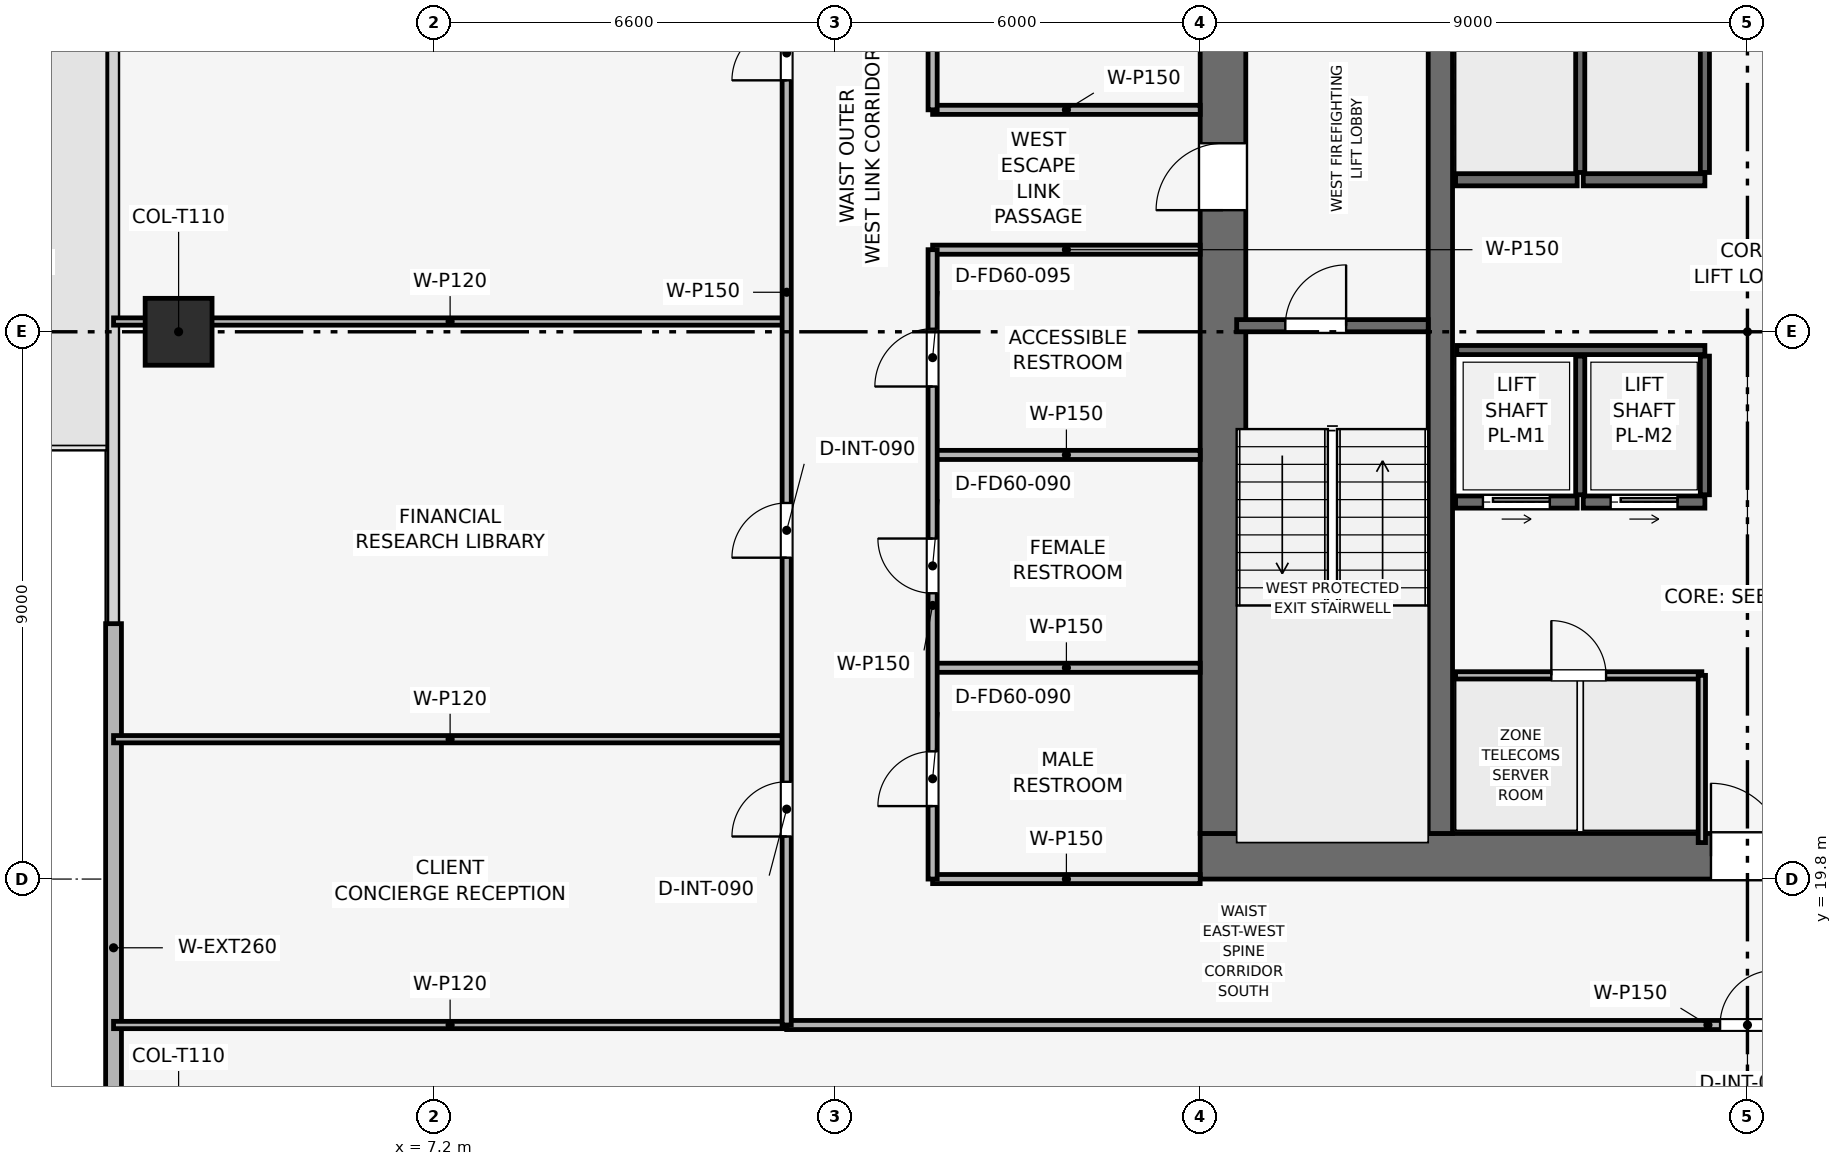
"""IFC4 building model, lengths in metres.
Left out: names, types, materials, properties, quantities, classifications, styles, units other than length and angle.
Written with IfcOpenShell. Run it as: python <this file> out.ifc"""

import sys

from ifc_helpers import new_model, si_unit, direction, frame, frame_2d, origin, origin_2d, place, context, subcontext, project, spatial, rectangle, extrude, element, fill, save


model = new_model("IFC4")
c1 = context("Model", 3, precision=1e-05, world=origin(), true_north=direction((0.0, 1.0)))
c2 = subcontext(c1, "Body", "Model", "MODEL_VIEW")
j1 = project(units=[si_unit("LENGTHUNIT", "METRE"), si_unit("PLANEANGLEUNIT", "RADIAN")], contexts=[c1])
p1 = place(None, origin())
s1 = spatial("IfcSite", under=j1, at=p1, CompositionType="ELEMENT")
p2 = place(p1, origin())
s2 = spatial("IfcBuilding", under=s1, at=p2, CompositionType="ELEMENT")
p3 = place(p2, frame((0.0, 0.0, 207.45)))
s3 = spatial("IfcBuildingStorey", under=s2, at=p3, CompositionType="ELEMENT", Elevation=207.45)
p4 = place(p3, frame((19.8, 20.175, 0.0), z_axis=(0.0, 0.0, 1.0), x_axis=(1.0, 0.0, 0.0)))
e1 = element("IfcWall", 1, at=p4, inside=s3, PredefinedType="SHEAR", context=c2, shape_type="SweptSolid", body=[
    extrude(rectangle(XDim=18.0, YDim=0.75, at=frame_2d((9.0, 0.0))), origin(), (0.0, 0.0, 1.0), 3.75),
])
p5 = place(p4, frame((8.4, 0.0, 0.0)))
e2 = element("IfcOpeningElement", 2, at=p5, cuts=e1, PredefinedType="OPENING", context=c2, shape_type="SweptSolid", body=[
    extrude(rectangle(XDim=1.2, YDim=2.2, at=frame_2d((0.6, 1.1))), frame((0.0, 0.385, 0.0), z_axis=(0.0, -1.0, 0.0), x_axis=(1.0, 0.0, 0.0)), (0.0, 0.0, 1.0), 0.77),
])
p6 = place(p3, frame((20.175, 20.55, 0.0), z_axis=(0.0, 0.0, 1.0), x_axis=(0.0, 1.0, 0.0)))
e3 = element("IfcWall", 3, at=p6, inside=s3, PredefinedType="SHEAR", context=c2, shape_type="SweptSolid", body=[
    extrude(rectangle(XDim=16.5, YDim=0.75, at=frame_2d((8.25, 0.0))), origin(), (0.0, 0.0, 1.0), 3.75),
])
p7 = place(p6, frame((10.25, 0.0, 0.0)))
e4 = element("IfcOpeningElement", 4, at=p7, cuts=e3, PredefinedType="OPENING", context=c2, shape_type="SweptSolid", body=[
    extrude(rectangle(XDim=1.1, YDim=2.15, at=frame_2d((0.55, 1.075))), frame((0.0, 0.385, 0.0), z_axis=(0.0, -1.0, 0.0), x_axis=(1.0, 0.0, 0.0)), (0.0, 0.0, 1.0), 0.77),
])
p8 = place(p3, frame((23.75, 20.55, 0.0), z_axis=(0.0, 0.0, 1.0), x_axis=(0.0, 1.0, 0.0)))
e5 = element("IfcWall", 5, at=p8, inside=s3, PredefinedType="SHEAR", context=c2, shape_type="SweptSolid", body=[
    extrude(rectangle(XDim=16.5, YDim=0.4, at=frame_2d((8.25, 0.0))), origin(), (0.0, 0.0, 1.0), 3.75),
])
p9 = place(p3, frame((3.0, 28.8, 0.003), z_axis=(0.0, 0.0, 1.0), x_axis=(1.0, 0.0, 0.0)))
e6 = element("IfcColumn", 6, at=p9, inside=s3, PredefinedType="COLUMN", context=c2, shape_type="SweptSolid", body=[
    extrude(rectangle(XDim=1.1, YDim=1.1, at=origin_2d()), origin(), (0.0, 0.0, 1.0), 3.494),
])
p10 = place(p3, frame((1.93, 9.3, 0.0), z_axis=(0.0, 0.0, 1.0), x_axis=(0.0, 1.0, 0.0)))
e7 = element("IfcWall", 7, at=p10, inside=s3, PredefinedType="SOLIDWALL", context=c2, shape_type="SweptSolid", body=[
    extrude(rectangle(XDim=14.7, YDim=0.26, at=frame_2d((7.35, 0.0))), origin(), (0.0, 0.0, 1.0), 3.5),
])
p11 = place(p10, frame((0.25, 0.0, 0.9)))
e8 = element("IfcOpeningElement", 8, at=p11, cuts=e7, PredefinedType="OPENING", context=c2, shape_type="SweptSolid", body=[
    extrude(rectangle(XDim=3.8, YDim=1.9, at=frame_2d((1.9, 0.95))), frame((0.0, 0.14, 0.0), z_axis=(0.0, -1.0, 0.0), x_axis=(1.0, 0.0, 0.0)), (0.0, 0.0, 1.0), 0.28),
])
p12 = place(p3, frame((20.4, 28.9, 0.0), z_axis=(0.0, 0.0, 1.0), x_axis=(1.0, 0.0, 0.0)))
e9 = element("IfcWall", 9, at=p12, inside=s3, PredefinedType="SHEAR", context=c2, shape_type="SweptSolid", body=[
    extrude(rectangle(XDim=3.15, YDim=0.2, at=frame_2d((1.575, 0.0))), origin(), (0.0, 0.0, 1.0), 3.5),
])
p13 = place(p12, frame((0.8, 0.0, 0.0)))
e10 = element("IfcOpeningElement", 10, at=p13, cuts=e9, PredefinedType="OPENING", context=c2, shape_type="SweptSolid", body=[
    extrude(rectangle(XDim=1.0, YDim=2.1, at=frame_2d((0.5, 1.05))), frame((0.0, 0.11, 0.0), z_axis=(0.0, -1.0, 0.0), x_axis=(1.0, 0.0, 0.0)), (0.0, 0.0, 1.0), 0.22),
])
p14 = place(p3, frame((24.0, 26.0, 0.0), z_axis=(0.0, 0.0, 1.0), x_axis=(1.0, 0.0, 0.0)))
e11 = element("IfcWall", 11, at=p14, inside=s3, PredefinedType="SHEAR", context=c2, shape_type="SweptSolid", body=[
    extrude(rectangle(XDim=2.0, YDim=0.2, at=frame_2d((1.0, 0.0))), origin(), (0.0, 0.0, 1.0), 3.5),
])
p15 = place(p14, frame((0.45, 0.0, 0.0)))
e12 = element("IfcOpeningElement", 12, at=p15, cuts=e11, PredefinedType="OPENING", context=c2, shape_type="SweptSolid", body=[
    extrude(rectangle(XDim=1.1, YDim=2.15, at=frame_2d((0.55, 1.075))), frame((0.0, 0.11, 0.0), z_axis=(0.0, -1.0, 0.0), x_axis=(1.0, 0.0, 0.0)), (0.0, 0.0, 1.0), 0.22),
])
p16 = place(p3, frame((26.1, 26.0, 0.0), z_axis=(0.0, 0.0, 1.0), x_axis=(1.0, 0.0, 0.0)))
e13 = element("IfcWall", 13, at=p16, inside=s3, PredefinedType="SHEAR", context=c2, shape_type="SweptSolid", body=[
    extrude(rectangle(XDim=2.0, YDim=0.2, at=frame_2d((1.0, 0.0))), origin(), (0.0, 0.0, 1.0), 3.5),
])
p17 = place(p16, frame((0.45, 0.0, 0.0)))
e14 = element("IfcOpeningElement", 14, at=p17, cuts=e13, PredefinedType="OPENING", context=c2, shape_type="SweptSolid", body=[
    extrude(rectangle(XDim=1.1, YDim=2.15, at=frame_2d((0.55, 1.075))), frame((0.0, 0.11, 0.0), z_axis=(0.0, -1.0, 0.0), x_axis=(1.0, 0.0, 0.0)), (0.0, 0.0, 1.0), 0.22),
])
for number, where, z_axis, x_axis in (
    (15, (24.0, 31.3, 0.0), (0.0, 0.0, 1.0), (1.0, 0.0, 0.0)),
    (16, (26.1, 31.3, 0.0), (0.0, 0.0, 1.0), (1.0, 0.0, 0.0)),
):
    element("IfcWall", number, at=place(p3, frame(where, z_axis=z_axis, x_axis=x_axis)), inside=s3, PredefinedType="SHEAR", context=c2, shape_type="SweptSolid", body=[
        extrude(rectangle(XDim=2.0, YDim=0.2, at=frame_2d((1.0, 0.0))), origin(), (0.0, 0.0, 1.0), 3.5),
    ])
p18 = place(p3, frame((24.02, 28.5, 0.0), z_axis=(0.0, 0.0, 1.0), x_axis=(1.0, 0.0, 0.0)))
e17 = element("IfcWall", 17, at=p18, inside=s3, PredefinedType="SHEAR", context=c2, shape_type="SweptSolid", body=[
    extrude(rectangle(XDim=4.08, YDim=0.15, at=frame_2d((2.04, 0.0))), origin(), (0.0, 0.0, 1.0), 3.5),
])
for number, where, z_axis, x_axis in (
    (18, (26.05, 26.12, 0.0), (0.0, 0.0, 1.0), (0.0, 1.0, 0.0)),
    (19, (28.1, 26.12, 0.0), (0.0, 0.0, 1.0), (0.0, 1.0, 0.0)),
):
    element("IfcWall", number, at=place(p3, frame(where, z_axis=z_axis, x_axis=x_axis)), inside=s3, PredefinedType="SHEAR", context=c2, shape_type="SweptSolid", body=[
        extrude(rectangle(XDim=2.28, YDim=0.15, at=frame_2d((1.14, 0.0))), origin(), (0.0, 0.0, 1.0), 3.5),
    ])
for number, where, z_axis, x_axis in (
    (20, (26.05, 31.42, 0.0), (0.0, 0.0, 1.0), (0.0, 1.0, 0.0)),
    (21, (28.1, 31.42, 0.0), (0.0, 0.0, 1.0), (0.0, 1.0, 0.0)),
):
    element("IfcWall", number, at=place(p3, frame(where, z_axis=z_axis, x_axis=x_axis)), inside=s3, PredefinedType="SHEAR", context=c2, shape_type="SweptSolid", body=[
        extrude(rectangle(XDim=2.24, YDim=0.15, at=frame_2d((1.12, 0.0))), origin(), (0.0, 0.0, 1.0), 3.5),
    ])
p19 = place(p3, frame((24.0, 23.15, 0.0), z_axis=(0.0, 0.0, 1.0), x_axis=(1.0, 0.0, 0.0)))
e22 = element("IfcWall", 22, at=p19, inside=s3, PredefinedType="PARTITIONING", context=c2, shape_type="SweptSolid", body=[
    extrude(rectangle(XDim=4.05, YDim=0.12, at=frame_2d((2.025, 0.0))), origin(), (0.0, 0.0, 1.0), 3.5),
])
p20 = place(p19, frame((1.575, 0.0, 0.0)))
e23 = element("IfcOpeningElement", 23, at=p20, cuts=e22, PredefinedType="OPENING", context=c2, shape_type="SweptSolid", body=[
    extrude(rectangle(XDim=0.9, YDim=2.1, at=frame_2d((0.45, 1.05))), frame((0.0, 0.07, 0.0), z_axis=(0.0, -1.0, 0.0), x_axis=(1.0, 0.0, 0.0)), (0.0, 0.0, 1.0), 0.14),
])
p21 = place(p3, frame((28.05, 20.4, 0.0), z_axis=(0.0, 0.0, 1.0), x_axis=(0.0, 1.0, 0.0)))
e24 = element("IfcWall", 24, at=p21, inside=s3, PredefinedType="PARTITIONING", context=c2, shape_type="SweptSolid", body=[
    extrude(rectangle(XDim=2.75, YDim=0.12, at=frame_2d((1.375, 0.0))), origin(), (0.0, 0.0, 1.0), 3.5),
])
p22 = place(p3, frame((15.4, 19.8, 0.0), z_axis=(0.0, 0.0, 1.0), x_axis=(1.0, 0.0, 0.0)))
e25 = element("IfcWall", 25, at=p22, inside=s3, PredefinedType="PARTITIONING", context=c2, shape_type="SweptSolid", body=[
    extrude(rectangle(XDim=4.4, YDim=0.15, at=frame_2d((2.2, 0.0))), origin(), (0.0, 0.0, 1.0), 3.035),
])
for number, where, z_axis, x_axis in (
    (26, (15.4, 23.275, 0.0), (0.0, 0.0, 1.0), (1.0, 0.0, 0.0)),
    (27, (15.4, 26.775, 0.0), (0.0, 0.0, 1.0), (1.0, 0.0, 0.0)),
    (28, (15.4, 30.15, 0.0), (0.0, 0.0, 1.0), (1.0, 0.0, 0.0)),
    (29, (15.4, 32.45, 0.0), (0.0, 0.0, 1.0), (1.0, 0.0, 0.0)),
):
    element("IfcWall", number, at=place(p3, frame(where, z_axis=z_axis, x_axis=x_axis)), inside=s3, PredefinedType="PARTITIONING", context=c2, shape_type="SweptSolid", body=[
        extrude(rectangle(XDim=4.4, YDim=0.15, at=frame_2d((2.2, 0.0))), origin(), (0.0, 0.0, 1.0), 3.5),
    ])
p23 = place(p3, frame((15.4, 19.8, 0.0), z_axis=(0.0, 0.0, 1.0), x_axis=(0.0, 1.0, 0.0)))
e30 = element("IfcWall", 30, at=p23, inside=s3, PredefinedType="PARTITIONING", context=c2, shape_type="SweptSolid", body=[
    extrude(rectangle(XDim=10.35, YDim=0.15, at=frame_2d((5.175, 0.0))), origin(), (0.0, 0.0, 1.0), 3.035),
])
p24 = place(p23, frame((1.2, 0.0, 0.0)))
e31 = element("IfcOpeningElement", 31, at=p24, cuts=e30, PredefinedType="OPENING", context=c2, shape_type="SweptSolid", body=[
    extrude(rectangle(XDim=0.9, YDim=2.1, at=frame_2d((0.45, 1.05))), frame((0.0, 0.085, 0.0), z_axis=(0.0, -1.0, 0.0), x_axis=(1.0, 0.0, 0.0)), (0.0, 0.0, 1.0), 0.17),
])
p25 = place(p23, frame((4.7, 0.0, 0.0)))
e32 = element("IfcOpeningElement", 32, at=p25, cuts=e30, PredefinedType="OPENING", context=c2, shape_type="SweptSolid", body=[
    extrude(rectangle(XDim=0.9, YDim=2.1, at=frame_2d((0.45, 1.05))), frame((0.0, 0.085, 0.0), z_axis=(0.0, -1.0, 0.0), x_axis=(1.0, 0.0, 0.0)), (0.0, 0.0, 1.0), 0.17),
])
p26 = place(p23, frame((8.1, 0.0, 0.0)))
e33 = element("IfcOpeningElement", 33, at=p26, cuts=e30, PredefinedType="OPENING", context=c2, shape_type="SweptSolid", body=[
    extrude(rectangle(XDim=0.95, YDim=2.1, at=frame_2d((0.475, 1.05))), frame((0.0, 0.085, 0.0), z_axis=(0.0, -1.0, 0.0), x_axis=(1.0, 0.0, 0.0)), (0.0, 0.0, 1.0), 0.17),
])
p27 = place(p3, frame((15.4, 32.45, 0.0), z_axis=(0.0, 0.0, 1.0), x_axis=(0.0, 1.0, 0.0)))
e34 = element("IfcWall", 34, at=p27, inside=s3, PredefinedType="PARTITIONING", context=c2, shape_type="SweptSolid", body=[
    extrude(rectangle(XDim=5.35, YDim=0.15, at=frame_2d((2.675, 0.0))), origin(), (0.0, 0.0, 1.0), 3.035),
])
p28 = place(p27, frame((2.1, 0.0, 0.0)))
e35 = element("IfcOpeningElement", 35, at=p28, cuts=e34, PredefinedType="OPENING", context=c2, shape_type="SweptSolid", body=[
    extrude(rectangle(XDim=0.9, YDim=2.1, at=frame_2d((0.45, 1.05))), frame((0.0, 0.085, 0.0), z_axis=(0.0, -1.0, 0.0), x_axis=(1.0, 0.0, 0.0)), (0.0, 0.0, 1.0), 0.17),
])
for number, where, z_axis, x_axis in (
    (36, (1.93, 22.1, 0.0), (0.0, 0.0, 1.0), (1.0, 0.0, 0.0)),
    (37, (1.93, 28.969, 0.0), (0.0, 0.0, 1.0), (1.0, 0.0, 0.0)),
    (38, (1.93, 17.4, 0.0), (0.0, 0.0, 1.0), (1.0, 0.0, 0.0)),
):
    element("IfcWall", number, at=place(p3, frame(where, z_axis=z_axis, x_axis=x_axis)), inside=s3, PredefinedType="PARTITIONING", context=c2, shape_type="SweptSolid", body=[
        extrude(rectangle(XDim=11.07, YDim=0.12, at=frame_2d((5.535, 0.0))), origin(), (0.0, 0.0, 1.0), 2.885),
    ])
p29 = place(p3, frame((13.0, 17.4, 0.0), z_axis=(0.0, 0.0, 1.0), x_axis=(1.0, 0.0, 0.0)))
e39 = element("IfcWall", 39, at=p29, inside=s3, PredefinedType="PARTITIONING", context=c2, shape_type="SweptSolid", body=[
    extrude(rectangle(XDim=31.6, YDim=0.15, at=frame_2d((15.8, 0.0))), origin(), (0.0, 0.0, 1.0), 3.035),
])
p30 = place(p29, frame((15.35, 0.0, 0.0)))
e40 = element("IfcOpeningElement", 40, at=p30, cuts=e39, PredefinedType="OPENING", context=c2, shape_type="SweptSolid", body=[
    extrude(rectangle(XDim=0.9, YDim=2.1, at=frame_2d((0.45, 1.05))), frame((0.0, 0.085, 0.0), z_axis=(0.0, -1.0, 0.0), x_axis=(1.0, 0.0, 0.0)), (0.0, 0.0, 1.0), 0.17),
])
p31 = place(p3, frame((13.0, 17.4, 0.0), z_axis=(0.0, 0.0, 1.0), x_axis=(0.0, 1.0, 0.0)))
e41 = element("IfcWall", 41, at=p31, inside=s3, PredefinedType="PARTITIONING", context=c2, shape_type="SweptSolid", body=[
    extrude(rectangle(XDim=22.8, YDim=0.15, at=frame_2d((11.4, 0.0))), origin(), (0.0, 0.0, 1.0), 3.035),
])
p32 = place(p31, frame((3.1, 0.0, 0.0)))
e42 = element("IfcOpeningElement", 42, at=p32, cuts=e41, PredefinedType="OPENING", context=c2, shape_type="SweptSolid", body=[
    extrude(rectangle(XDim=0.9, YDim=2.1, at=frame_2d((0.45, 1.05))), frame((0.0, 0.085, 0.0), z_axis=(0.0, -1.0, 0.0), x_axis=(1.0, 0.0, 0.0)), (0.0, 0.0, 1.0), 0.17),
])
p33 = place(p31, frame((7.685, 0.0, 0.0)))
e43 = element("IfcOpeningElement", 43, at=p33, cuts=e41, PredefinedType="OPENING", context=c2, shape_type="SweptSolid", body=[
    extrude(rectangle(XDim=0.9, YDim=2.1, at=frame_2d((0.45, 1.05))), frame((0.0, 0.085, 0.0), z_axis=(0.0, -1.0, 0.0), x_axis=(1.0, 0.0, 0.0)), (0.0, 0.0, 1.0), 0.17),
])
p34 = place(p31, frame((15.535, 0.0, 0.0)))
e44 = element("IfcOpeningElement", 44, at=p34, cuts=e41, PredefinedType="OPENING", context=c2, shape_type="SweptSolid", body=[
    extrude(rectangle(XDim=0.9, YDim=2.1, at=frame_2d((0.45, 1.05))), frame((0.0, 0.085, 0.0), z_axis=(0.0, -1.0, 0.0), x_axis=(1.0, 0.0, 0.0)), (0.0, 0.0, 1.0), 0.17),
])
p35 = place(p13, origin())
e45 = element("IfcDoor", 45, at=p35, inside=s3, OperationType="SINGLE_SWING_RIGHT", PredefinedType="DOOR", context=c2, shape_type="SweptSolid", body=[
    extrude(rectangle(XDim=1.0, YDim=2.1, at=frame_2d((0.5, 1.05))), frame((0.0, 0.025, 0.0), z_axis=(0.0, -1.0, 0.0), x_axis=(1.0, 0.0, 0.0)), (0.0, 0.0, 1.0), 0.05),
])
fill(e10, e45)
p36 = place(p15, origin())
e46 = element("IfcDoor", 46, at=p36, inside=s3, OperationType="SLIDING_TO_RIGHT", PredefinedType="DOOR", context=c2, shape_type="SweptSolid", body=[
    extrude(rectangle(XDim=1.1, YDim=2.15, at=frame_2d((0.55, 1.075))), frame((0.0, 0.025, 0.0), z_axis=(0.0, -1.0, 0.0), x_axis=(1.0, 0.0, 0.0)), (0.0, 0.0, 1.0), 0.05),
])
fill(e12, e46)
p37 = place(p17, origin())
e47 = element("IfcDoor", 47, at=p37, inside=s3, OperationType="SLIDING_TO_RIGHT", PredefinedType="DOOR", context=c2, shape_type="SweptSolid", body=[
    extrude(rectangle(XDim=1.1, YDim=2.15, at=frame_2d((0.55, 1.075))), frame((0.0, 0.025, 0.0), z_axis=(0.0, -1.0, 0.0), x_axis=(1.0, 0.0, 0.0)), (0.0, 0.0, 1.0), 0.05),
])
fill(e14, e47)
p38 = place(p20, origin())
e48 = element("IfcDoor", 48, at=p38, inside=s3, OperationType="SINGLE_SWING_LEFT", PredefinedType="DOOR", context=c2, shape_type="SweptSolid", body=[
    extrude(rectangle(XDim=0.9, YDim=2.1, at=frame_2d((0.45, 1.05))), frame((0.0, 0.025, 0.0), z_axis=(0.0, -1.0, 0.0), x_axis=(1.0, 0.0, 0.0)), (0.0, 0.0, 1.0), 0.05),
])
fill(e23, e48)
p39 = place(p24, origin())
e49 = element("IfcDoor", 49, at=p39, inside=s3, OperationType="SINGLE_SWING_LEFT", PredefinedType="DOOR", context=c2, shape_type="SweptSolid", body=[
    extrude(rectangle(XDim=0.9, YDim=2.1, at=frame_2d((0.45, 1.05))), frame((0.0, 0.025, 0.0), z_axis=(0.0, -1.0, 0.0), x_axis=(1.0, 0.0, 0.0)), (0.0, 0.0, 1.0), 0.05),
])
fill(e31, e49)
p40 = place(p25, origin())
e50 = element("IfcDoor", 50, at=p40, inside=s3, OperationType="SINGLE_SWING_RIGHT", PredefinedType="DOOR", context=c2, shape_type="SweptSolid", body=[
    extrude(rectangle(XDim=0.9, YDim=2.1, at=frame_2d((0.45, 1.05))), frame((0.0, 0.025, 0.0), z_axis=(0.0, -1.0, 0.0), x_axis=(1.0, 0.0, 0.0)), (0.0, 0.0, 1.0), 0.05),
])
fill(e32, e50)
p41 = place(p26, origin())
e51 = element("IfcDoor", 51, at=p41, inside=s3, OperationType="SINGLE_SWING_LEFT", PredefinedType="DOOR", context=c2, shape_type="SweptSolid", body=[
    extrude(rectangle(XDim=0.95, YDim=2.1, at=frame_2d((0.475, 1.05))), frame((0.0, 0.025, 0.0), z_axis=(0.0, -1.0, 0.0), x_axis=(1.0, 0.0, 0.0)), (0.0, 0.0, 1.0), 0.05),
])
fill(e33, e51)
p42 = place(p30, origin())
e52 = element("IfcDoor", 52, at=p42, inside=s3, OperationType="SINGLE_SWING_RIGHT", PredefinedType="DOOR", context=c2, shape_type="SweptSolid", body=[
    extrude(rectangle(XDim=0.9, YDim=2.1, at=frame_2d((0.45, 1.05))), frame((0.0, 0.025, 0.0), z_axis=(0.0, -1.0, 0.0), x_axis=(1.0, 0.0, 0.0)), (0.0, 0.0, 1.0), 0.05),
])
fill(e40, e52)
p43 = place(p32, origin())
e53 = element("IfcDoor", 53, at=p43, inside=s3, OperationType="SINGLE_SWING_LEFT", PredefinedType="DOOR", context=c2, shape_type="SweptSolid", body=[
    extrude(rectangle(XDim=0.9, YDim=2.1, at=frame_2d((0.45, 1.05))), frame((0.0, 0.025, 0.0), z_axis=(0.0, -1.0, 0.0), x_axis=(1.0, 0.0, 0.0)), (0.0, 0.0, 1.0), 0.05),
])
fill(e42, e53)
p44 = place(p33, origin())
e54 = element("IfcDoor", 54, at=p44, inside=s3, OperationType="SINGLE_SWING_LEFT", PredefinedType="DOOR", context=c2, shape_type="SweptSolid", body=[
    extrude(rectangle(XDim=0.9, YDim=2.1, at=frame_2d((0.45, 1.05))), frame((0.0, 0.025, 0.0), z_axis=(0.0, -1.0, 0.0), x_axis=(1.0, 0.0, 0.0)), (0.0, 0.0, 1.0), 0.05),
])
fill(e43, e54)
p45 = place(p34, origin())
e55 = element("IfcDoor", 55, at=p45, inside=s3, OperationType="SINGLE_SWING_LEFT", PredefinedType="DOOR", context=c2, shape_type="SweptSolid", body=[
    extrude(rectangle(XDim=0.9, YDim=2.1, at=frame_2d((0.45, 1.05))), frame((0.0, 0.025, 0.0), z_axis=(0.0, -1.0, 0.0), x_axis=(1.0, 0.0, 0.0)), (0.0, 0.0, 1.0), 0.05),
])
fill(e44, e55)
p46 = place(p7, origin())
e56 = element("IfcDoor", 56, at=p46, inside=s3, OperationType="SINGLE_SWING_LEFT", PredefinedType="DOOR", context=c2, shape_type="SweptSolid", body=[
    extrude(rectangle(XDim=1.1, YDim=2.15, at=frame_2d((0.55, 1.075))), frame((0.0, 0.025, 0.0), z_axis=(0.0, -1.0, 0.0), x_axis=(1.0, 0.0, 0.0)), (0.0, 0.0, 1.0), 0.05),
])
fill(e4, e56)
p47 = place(p5, origin())
e57 = element("IfcDoor", 57, at=p47, inside=s3, OperationType="SINGLE_SWING_LEFT", PredefinedType="DOOR", context=c2, shape_type="SweptSolid", body=[
    extrude(rectangle(XDim=1.2, YDim=2.2, at=frame_2d((0.6, 1.1))), frame((0.0, 0.025, 0.0), z_axis=(0.0, -1.0, 0.0), x_axis=(1.0, 0.0, 0.0)), (0.0, 0.0, 1.0), 0.05),
])
fill(e2, e57)
save(model, sys.argv[1])
